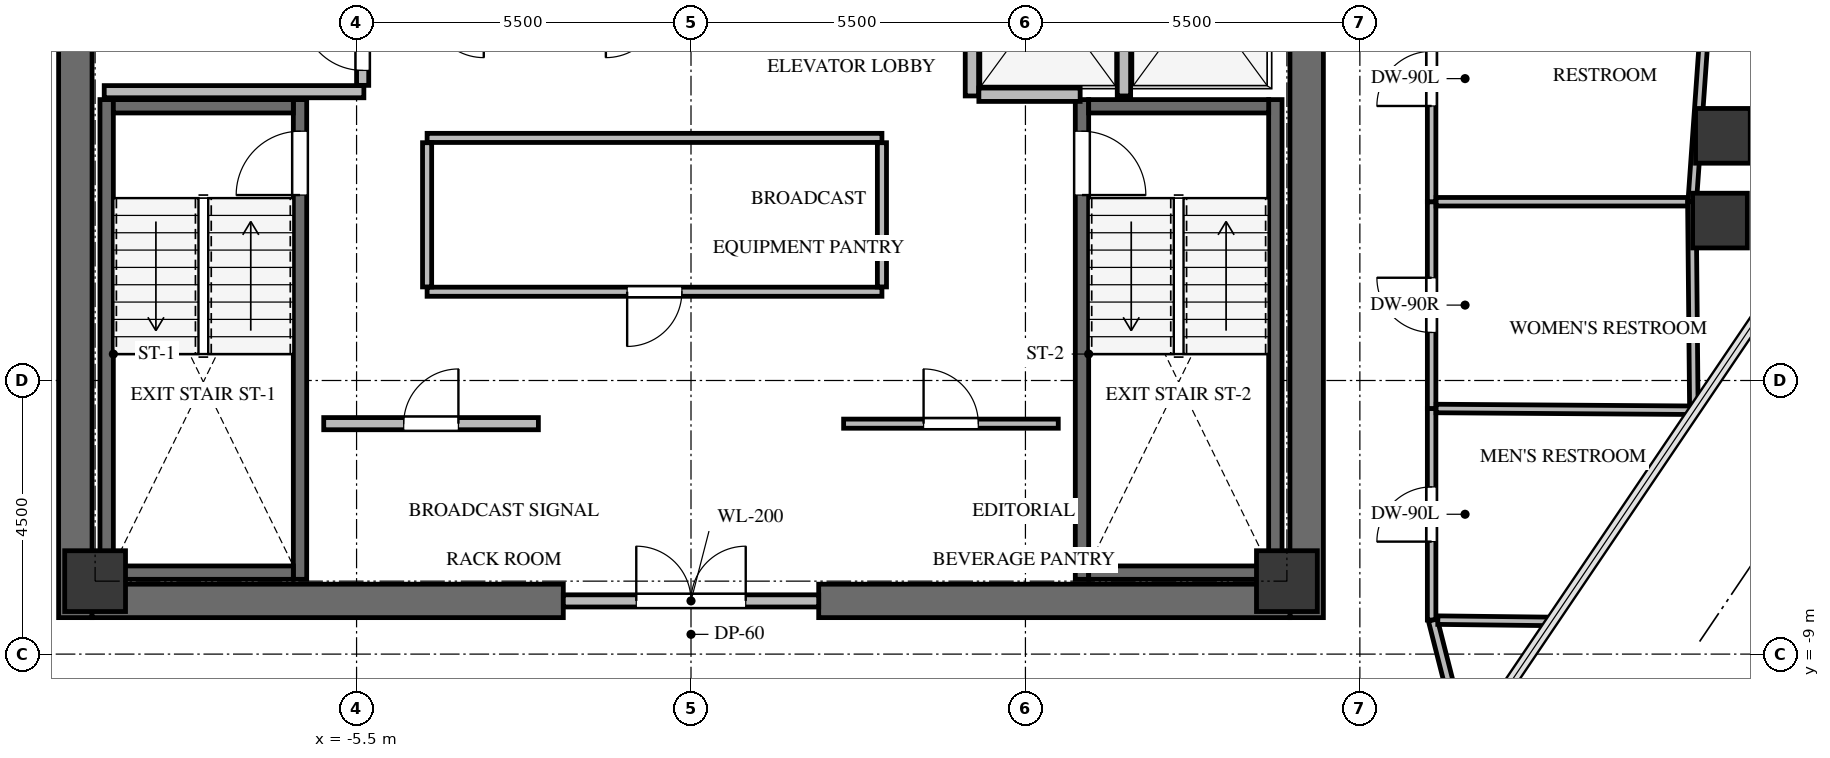
"""IFC4 building model, lengths in metres.
Left out: names, types, materials, properties, quantities, classifications, styles, units other than length and angle.
Written with IfcOpenShell. Run it as: python <this file> out.ifc"""

import sys

from ifc_helpers import new_model, si_unit, direction, frame, frame_2d, origin, origin_2d, place, context, subcontext, project, spatial, rectangle, extrude, source, transform, mapped, element, fill, save


model = new_model("IFC4")
c1 = context("Model", 3, precision=1e-05, world=origin(), true_north=direction((0.0, 1.0)))
c2 = subcontext(c1, "Body", "Model", "MODEL_VIEW")
j1 = project(units=[si_unit("LENGTHUNIT", "METRE"), si_unit("PLANEANGLEUNIT", "RADIAN")], contexts=[c1])
p1 = place(None, origin())
s1 = spatial("IfcSite", under=j1, at=p1, CompositionType="ELEMENT")
p2 = place(p1, origin())
s2 = spatial("IfcBuilding", under=s1, at=p2, CompositionType="ELEMENT")
p3 = place(p2, frame((0.0, 0.0, 241.4)))
s3 = spatial("IfcBuildingStorey", under=s2, at=p3, CompositionType="ELEMENT", Elevation=241.4)
for number, where, z_axis, x_axis in (
    (1, (-10.125, -8.4, 0.0), (0.0, 0.0, 1.0), (0.0, 1.0, 0.0)),
    (2, (10.125, -8.4, 0.0), (0.0, 0.0, 1.0), (0.0, 1.0, 0.0)),
):
    element("IfcWall", number, at=place(p3, frame(where, z_axis=z_axis, x_axis=x_axis)), inside=s3, PredefinedType="SHEAR", context=c2, shape_type="SweptSolid", body=[
        extrude(rectangle(XDim=16.8, YDim=0.55, at=frame_2d((8.4, 0.0))), origin(), (0.0, 0.0, 1.0), 3.3),
    ])
for number, where, z_axis, x_axis in (
    (3, (-9.85, -8.125, 0.0), (0.0, 0.0, 1.0), (1.0, 0.0, 0.0)),
    (4, (2.1, -8.125, 0.0), (0.0, 0.0, 1.0), (1.0, 0.0, 0.0)),
):
    element("IfcWall", number, at=place(p3, frame(where, z_axis=z_axis, x_axis=x_axis)), inside=s3, PredefinedType="SHEAR", context=c2, shape_type="SweptSolid", body=[
        extrude(rectangle(XDim=7.75, YDim=0.55, at=frame_2d((3.875, 0.0))), origin(), (0.0, 0.0, 1.0), 3.3),
    ])
p4 = place(p3, frame((-6.43, -7.77, -0.24), z_axis=(0.0, 0.0, 1.0), x_axis=(0.0, 1.0, 0.0)))
e5 = element("IfcWall", 5, at=p4, inside=s3, PredefinedType="SHEAR", context=c2, shape_type="SweptSolid", body=[
    extrude(rectangle(XDim=7.89, YDim=0.22, at=frame_2d((3.945, 0.0))), origin(), (0.0, 0.0, 1.0), 3.3),
])
p5 = place(p4, frame((6.32, 0.0, 0.0)))
e6 = element("IfcOpeningElement", 6, at=p5, cuts=e5, PredefinedType="OPENING", context=c2, shape_type="SweptSolid", body=[
    extrude(rectangle(XDim=1.05, YDim=2.15, at=frame_2d((0.525, 1.075))), frame((0.0, 0.12, 0.0), z_axis=(0.0, -1.0, 0.0), x_axis=(1.0, 0.0, 0.0)), (0.0, 0.0, 1.0), 0.24),
])
p6 = place(p3, frame((-9.61, 0.12, -0.24), z_axis=(0.0, 0.0, 1.0), x_axis=(0.0, -1.0, 0.0)))
e7 = element("IfcWall", 7, at=p6, inside=s3, PredefinedType="SHEAR", context=c2, shape_type="SweptSolid", body=[
    extrude(rectangle(XDim=7.89, YDim=0.22, at=frame_2d((3.945, 0.0))), origin(), (0.0, 0.0, 1.0), 3.3),
])
for number, where, z_axis, x_axis in (
    (8, (-9.5, -7.66, -0.24), (0.0, 0.0, 1.0), (1.0, 0.0, 0.0)),
    (9, (-6.54, 0.01, -0.24), (0.0, 0.0, 1.0), (-1.0, 0.0, 0.0)),
):
    element("IfcWall", number, at=place(p3, frame(where, z_axis=z_axis, x_axis=x_axis)), inside=s3, PredefinedType="SHEAR", context=c2, shape_type="SweptSolid", body=[
        extrude(rectangle(XDim=2.96, YDim=0.22, at=frame_2d((1.48, 0.0))), origin(), (0.0, 0.0, 1.0), 3.3),
    ])
p7 = place(p3, frame((9.61, -7.77, -0.24), z_axis=(0.0, 0.0, 1.0), x_axis=(0.0, 1.0, 0.0)))
e10 = element("IfcWall", 10, at=p7, inside=s3, PredefinedType="SHEAR", context=c2, shape_type="SweptSolid", body=[
    extrude(rectangle(XDim=7.89, YDim=0.22, at=frame_2d((3.945, 0.0))), origin(), (0.0, 0.0, 1.0), 3.3),
])
p8 = place(p3, frame((6.43, 0.12, -0.24), z_axis=(0.0, 0.0, 1.0), x_axis=(0.0, -1.0, 0.0)))
e11 = element("IfcWall", 11, at=p8, inside=s3, PredefinedType="SHEAR", context=c2, shape_type="SweptSolid", body=[
    extrude(rectangle(XDim=7.89, YDim=0.22, at=frame_2d((3.945, 0.0))), origin(), (0.0, 0.0, 1.0), 3.3),
])
p9 = place(p8, frame((0.52, 0.0, 0.0)))
e12 = element("IfcOpeningElement", 12, at=p9, cuts=e11, PredefinedType="OPENING", context=c2, shape_type="SweptSolid", body=[
    extrude(rectangle(XDim=1.05, YDim=2.15, at=frame_2d((0.525, 1.075))), frame((0.0, 0.12, 0.0), z_axis=(0.0, -1.0, 0.0), x_axis=(1.0, 0.0, 0.0)), (0.0, 0.0, 1.0), 0.24),
])
for number, where, z_axis, x_axis in (
    (13, (6.54, -7.66, -0.24), (0.0, 0.0, 1.0), (1.0, 0.0, 0.0)),
    (14, (9.5, 0.01, -0.24), (0.0, 0.0, 1.0), (-1.0, 0.0, 0.0)),
):
    element("IfcWall", number, at=place(p3, frame(where, z_axis=z_axis, x_axis=x_axis)), inside=s3, PredefinedType="SHEAR", context=c2, shape_type="SweptSolid", body=[
        extrude(rectangle(XDim=2.96, YDim=0.22, at=frame_2d((1.48, 0.0))), origin(), (0.0, 0.0, 1.0), 3.3),
    ])
m1 = source(origin(), c2, "Body", "SweptSolid", [
    extrude(rectangle(XDim=1.0, YDim=1.0, at=origin_2d()), origin(), (0.0, 0.0, 1.0), 3.3),
])
for number, where, z_axis, x_axis in (
    (15, (-9.8, -7.8, -0.24), (0.0, 0.0, 1.0), (1.0, 0.0, 0.0)),
    (16, (9.8, -7.8, -0.24), (0.0, 0.0, 1.0), (1.0, 0.0, 0.0)),
):
    element("IfcColumn", number, at=place(p3, frame(where, z_axis=z_axis, x_axis=x_axis)), inside=s3, PredefinedType="COLUMN", context=c2, shape_type="MappedRepresentation", body=[
        mapped(m1, transform((0.0, 0.0, 0.0), x_axis=(1.0, 0.0, 0.0), y_axis=(0.0, 1.0, 0.0), z_axis=(0.0, 0.0, 1.0), scale=1.0)),
    ])
m2 = source(origin(), c2, "Body", "SweptSolid", [
    extrude(rectangle(XDim=0.9, YDim=0.9, at=origin_2d()), origin(), (0.0, 0.0, 1.0), 3.3),
])
for number, where, z_axis, x_axis in (
    (17, (16.97, -0.476, -0.24), (0.0, 0.0, 1.0), (1.0, 0.0, 0.0)),
    (18, (16.922, -1.87, -0.24), (0.0, 0.0, 1.0), (1.0, 0.0, 0.0)),
):
    element("IfcColumn", number, at=place(p3, frame(where, z_axis=z_axis, x_axis=x_axis)), inside=s3, PredefinedType="COLUMN", context=c2, shape_type="MappedRepresentation", body=[
        mapped(m2, transform((0.0, 0.0, 0.0), x_axis=(1.0, 0.0, 0.0), y_axis=(0.0, 1.0, 0.0), z_axis=(0.0, 0.0, 1.0), scale=1.0)),
    ])
p10 = place(p3, frame((-2.1, -8.125, 0.0), z_axis=(0.0, 0.0, 1.0), x_axis=(1.0, 0.0, 0.0)))
e19 = element("IfcWall", 19, at=p10, inside=s3, PredefinedType="SOLIDWALL", context=c2, shape_type="SweptSolid", body=[
    extrude(rectangle(XDim=4.2, YDim=0.2, at=frame_2d((2.1, 0.0))), origin(), (0.0, 0.0, 1.0), 3.045),
])
p11 = place(p10, frame((1.2, 0.0, 0.0)))
e20 = element("IfcOpeningElement", 20, at=p11, cuts=e19, PredefinedType="OPENING", context=c2, shape_type="SweptSolid", body=[
    extrude(rectangle(XDim=1.8, YDim=2.15, at=frame_2d((0.9, 1.075))), frame((0.0, 0.11, 0.0), z_axis=(0.0, -1.0, 0.0), x_axis=(1.0, 0.0, 0.0)), (0.0, 0.0, 1.0), 0.22),
])
p12 = place(p3, frame((-9.65, 0.25, 0.0), z_axis=(0.0, 0.0, 1.0), x_axis=(1.0, 0.0, 0.0)))
e21 = element("IfcWall", 21, at=p12, inside=s3, PredefinedType="SOLIDWALL", context=c2, shape_type="SweptSolid", body=[
    extrude(rectangle(XDim=4.27, YDim=0.2, at=frame_2d((2.135, 0.0))), origin(), (0.0, 0.0, 1.0), 3.045),
])
p13 = place(p3, frame((-5.4, 0.354, 0.0), z_axis=(0.0, 0.0, 1.0), x_axis=(0.0, 1.0, 0.0)))
e22 = element("IfcWall", 22, at=p13, inside=s3, PredefinedType="SOLIDWALL", context=c2, shape_type="SweptSolid", body=[
    extrude(rectangle(XDim=4.026, YDim=0.2, at=frame_2d((2.013, 0.0))), origin(), (0.0, 0.0, 1.0), 3.045),
])
p14 = place(p13, frame((0.246, 0.0, 0.0)))
e23 = element("IfcOpeningElement", 23, at=p14, cuts=e22, PredefinedType="OPENING", context=c2, shape_type="SweptSolid", body=[
    extrude(rectangle(XDim=1.0, YDim=2.15, at=frame_2d((0.5, 1.075))), frame((0.0, 0.11, 0.0), z_axis=(0.0, -1.0, 0.0), x_axis=(1.0, 0.0, 0.0)), (0.0, 0.0, 1.0), 0.22),
])
for number, where, z_axis, x_axis in (
    (24, (4.62, 0.18, 0.0), (0.0, 0.0, 1.0), (0.0, 1.0, 0.0)),
    (25, (7.12, 0.18, 0.0), (0.0, 0.0, 1.0), (0.0, 1.0, 0.0)),
):
    element("IfcWall", number, at=place(p3, frame(where, z_axis=z_axis, x_axis=x_axis)), inside=s3, PredefinedType="SOLIDWALL", context=c2, shape_type="SweptSolid", body=[
        extrude(rectangle(XDim=3.186, YDim=0.22, at=frame_2d((1.593, 0.0))), origin(), (0.0, 0.0, 1.0), 3.045),
    ])
p15 = place(p3, frame((4.734, 0.2, 0.0), z_axis=(0.0, 0.0, 1.0), x_axis=(1.0, 0.0, 0.0)))
e26 = element("IfcWall", 26, at=p15, inside=s3, PredefinedType="SOLIDWALL", context=c2, shape_type="SweptSolid", body=[
    extrude(rectangle(XDim=1.666, YDim=0.22, at=frame_2d((0.833, 0.0))), origin(), (0.0, 0.0, 1.0), 3.045),
])
p16 = place(p3, frame((-6.04, -5.21, 0.0), z_axis=(0.0, 0.0, 1.0), x_axis=(1.0, 0.0, 0.0)))
e27 = element("IfcWall", 27, at=p16, inside=s3, PredefinedType="SOLIDWALL", context=c2, shape_type="SweptSolid", body=[
    extrude(rectangle(XDim=3.53, YDim=0.2, at=frame_2d((1.765, 0.0))), origin(), (0.0, 0.0, 1.0), 3.045),
])
p17 = place(p16, frame((1.315, 0.0, 0.0)))
e28 = element("IfcOpeningElement", 28, at=p17, cuts=e27, PredefinedType="OPENING", context=c2, shape_type="SweptSolid", body=[
    extrude(rectangle(XDim=0.9, YDim=2.05, at=frame_2d((0.45, 1.025))), frame((0.0, 0.11, 0.0), z_axis=(0.0, -1.0, 0.0), x_axis=(1.0, 0.0, 0.0)), (0.0, 0.0, 1.0), 0.22),
])
p18 = place(p3, frame((2.51, -5.21, 0.0), z_axis=(0.0, 0.0, 1.0), x_axis=(1.0, 0.0, 0.0)))
e29 = element("IfcWall", 29, at=p18, inside=s3, PredefinedType="PARTITIONING", context=c2, shape_type="SweptSolid", body=[
    extrude(rectangle(XDim=3.53, YDim=0.15, at=frame_2d((1.765, 0.0))), origin(), (0.0, 0.0, 1.0), 3.045),
])
p19 = place(p18, frame((1.315, 0.0, 0.0)))
e30 = element("IfcOpeningElement", 30, at=p19, cuts=e29, PredefinedType="OPENING", context=c2, shape_type="SweptSolid", body=[
    extrude(rectangle(XDim=0.9, YDim=2.05, at=frame_2d((0.45, 1.025))), frame((0.0, 0.085, 0.0), z_axis=(0.0, -1.0, 0.0), x_axis=(1.0, 0.0, 0.0)), (0.0, 0.0, 1.0), 0.17),
])
p20 = place(p3, frame((3.14, -3.04, 0.0), z_axis=(0.0, 0.0, 1.0), x_axis=(-1.0, 0.0, 0.0)))
e31 = element("IfcWall", 31, at=p20, inside=s3, PredefinedType="PARTITIONING", context=c2, shape_type="SweptSolid", body=[
    extrude(rectangle(XDim=7.48, YDim=0.15, at=frame_2d((3.74, 0.0))), origin(), (0.0, 0.0, 1.0), 3.045),
])
p21 = place(p20, frame((3.29, 0.0, 0.0)))
e32 = element("IfcOpeningElement", 32, at=p21, cuts=e31, PredefinedType="OPENING", context=c2, shape_type="SweptSolid", body=[
    extrude(rectangle(XDim=0.9, YDim=2.05, at=frame_2d((0.45, 1.025))), frame((0.0, 0.085, 0.0), z_axis=(0.0, -1.0, 0.0), x_axis=(1.0, 0.0, 0.0)), (0.0, 0.0, 1.0), 0.17),
])
p22 = place(p3, frame((-4.34, -0.51, 0.0), z_axis=(0.0, 0.0, 1.0), x_axis=(1.0, 0.0, 0.0)))
e33 = element("IfcWall", 33, at=p22, inside=s3, PredefinedType="PARTITIONING", context=c2, shape_type="SweptSolid", body=[
    extrude(rectangle(XDim=7.48, YDim=0.15, at=frame_2d((3.74, 0.0))), origin(), (0.0, 0.0, 1.0), 3.045),
])
for number, where, z_axis, x_axis in (
    (34, (-4.34, -2.961, 0.0), (0.0, 0.0, 1.0), (0.0, 1.0, 0.0)),
    (35, (3.14, -0.589, 0.0), (0.0, 0.0, 1.0), (0.0, -1.0, 0.0)),
):
    element("IfcWall", number, at=place(p3, frame(where, z_axis=z_axis, x_axis=x_axis)), inside=s3, PredefinedType="PARTITIONING", context=c2, shape_type="SweptSolid", body=[
        extrude(rectangle(XDim=2.372, YDim=0.15, at=frame_2d((1.186, 0.0))), origin(), (0.0, 0.0, 1.0), 3.045),
    ])
p23 = place(p3, frame((12.18, -8.44, 0.0), z_axis=(0.0, 0.0, 1.0), x_axis=(0.0, 1.0, 0.0)))
e36 = element("IfcWall", 36, at=p23, inside=s3, PredefinedType="PARTITIONING", context=c2, shape_type="SweptSolid", body=[
    extrude(rectangle(XDim=3.48, YDim=0.14, at=frame_2d((1.74, 0.0))), origin(), (0.0, 0.0, 1.0), 2.399),
])
p24 = place(p23, frame((1.29, 0.0, 0.0)))
e37 = element("IfcOpeningElement", 37, at=p24, cuts=e36, PredefinedType="OPENING", context=c2, shape_type="SweptSolid", body=[
    extrude(rectangle(XDim=0.9, YDim=2.05, at=frame_2d((0.45, 1.025))), frame((0.0, 0.08, 0.0), z_axis=(0.0, -1.0, 0.0), x_axis=(1.0, 0.0, 0.0)), (0.0, 0.0, 1.0), 0.16),
])
p25 = place(p3, frame((12.18, -4.96, 0.0), z_axis=(0.0, 0.0, 1.0), x_axis=(0.0, 1.0, 0.0)))
e38 = element("IfcWall", 38, at=p25, inside=s3, PredefinedType="PARTITIONING", context=c2, shape_type="SweptSolid", body=[
    extrude(rectangle(XDim=3.4, YDim=0.14, at=frame_2d((1.7, 0.0))), origin(), (0.0, 0.0, 1.0), 3.045),
])
p26 = place(p25, frame((1.25, 0.0, 0.0)))
e39 = element("IfcOpeningElement", 39, at=p26, cuts=e38, PredefinedType="OPENING", context=c2, shape_type="SweptSolid", body=[
    extrude(rectangle(XDim=0.9, YDim=2.05, at=frame_2d((0.45, 1.025))), frame((0.0, 0.08, 0.0), z_axis=(0.0, -1.0, 0.0), x_axis=(1.0, 0.0, 0.0)), (0.0, 0.0, 1.0), 0.16),
])
p27 = place(p3, frame((12.18, -1.56, 0.0), z_axis=(0.0, 0.0, 1.0), x_axis=(0.0, 1.0, 0.0)))
e40 = element("IfcWall", 40, at=p27, inside=s3, PredefinedType="PARTITIONING", context=c2, shape_type="SweptSolid", body=[
    extrude(rectangle(XDim=4.05, YDim=0.14, at=frame_2d((2.025, 0.0))), origin(), (0.0, 0.0, 1.0), 2.302),
])
p28 = place(p27, frame((1.575, 0.0, 0.0)))
e41 = element("IfcOpeningElement", 41, at=p28, cuts=e40, PredefinedType="OPENING", context=c2, shape_type="SweptSolid", body=[
    extrude(rectangle(XDim=0.9, YDim=2.05, at=frame_2d((0.45, 1.025))), frame((0.0, 0.08, 0.0), z_axis=(0.0, -1.0, 0.0), x_axis=(1.0, 0.0, 0.0)), (0.0, 0.0, 1.0), 0.16),
])
p29 = place(p3, frame((12.719, -10.478, 0.0), z_axis=(0.0, 0.0, 1.0), x_axis=(-0.246522636262, 0.969137033556, 0.0)))
e42 = element("IfcWall", 42, at=p29, inside=s3, PredefinedType="PARTITIONING", context=c2, shape_type="SweptSolid", body=[
    extrude(rectangle(XDim=2.103, YDim=0.15, at=frame_2d((1.051, 0.0))), origin(), (0.0, 0.0, 1.0), 2.399),
])
p30 = place(p3, frame((12.254, -4.96, 0.0), z_axis=(0.0, 0.0, 1.0), x_axis=(0.999976630429, -0.006836563198, 0.0)))
e43 = element("IfcWall", 43, at=p30, inside=s3, PredefinedType="PARTITIONING", context=c2, shape_type="SweptSolid", body=[
    extrude(rectangle(XDim=4.25, YDim=0.14, at=frame_2d((2.125, 0.0))), origin(), (0.0, 0.0, 1.0), 2.399),
])
p31 = place(p3, frame((14.156, -8.462, 0.0), z_axis=(0.0, 0.0, 1.0), x_axis=(-0.999935742613, 0.011336253532, 0.0)))
e44 = element("IfcWall", 44, at=p31, inside=s3, PredefinedType="PARTITIONING", context=c2, shape_type="SweptSolid", body=[
    extrude(rectangle(XDim=1.874, YDim=0.14, at=frame_2d((0.937, 0.0))), origin(), (0.0, 0.0, 1.0), 2.399),
])
p32 = place(p3, frame((12.254, -1.56, 0.0), z_axis=(0.0, 0.0, 1.0), x_axis=(1.0, 0.0, 0.0)))
e45 = element("IfcWall", 45, at=p32, inside=s3, PredefinedType="PARTITIONING", context=c2, shape_type="SweptSolid", body=[
    extrude(rectangle(XDim=4.206, YDim=0.14, at=frame_2d((2.103, 0.0))), origin(), (0.0, 0.0, 1.0), 2.302),
])
p33 = place(p3, frame((16.46, -1.56, 0.0), z_axis=(0.0, 0.0, 1.0), x_axis=(0.009604446748, -0.999953876238, 0.0)))
e46 = element("IfcWall", 46, at=p33, inside=s3, PredefinedType="PARTITIONING", context=c2, shape_type="SweptSolid", body=[
    extrude(rectangle(XDim=3.355, YDim=0.14, at=frame_2d((1.678, 0.0))), origin(), (0.0, 0.0, 1.0), 2.302),
])
p34 = place(p3, frame((16.76, 2.593, 0.0), z_axis=(0.0, 0.0, 1.0), x_axis=(-0.07055102187, -0.997508172053, 0.0)))
e47 = element("IfcWall", 47, at=p34, inside=s3, PredefinedType="PARTITIONING", context=c2, shape_type="SweptSolid", body=[
    extrude(rectangle(XDim=4.163, YDim=0.14, at=frame_2d((2.082, 0.0))), origin(), (0.0, 0.0, 1.0), 2.302),
])
m3 = source(origin(), c2, "Body", "SweptSolid", [
    extrude(rectangle(XDim=1.05, YDim=2.15, at=frame_2d((0.525, 1.075))), frame((0.0, 0.025, 0.0), z_axis=(0.0, -1.0, 0.0), x_axis=(1.0, 0.0, 0.0)), (0.0, 0.0, 1.0), 0.05),
])
p35 = place(p5, origin())
e48 = element("IfcDoor", 48, at=p35, inside=s3, OperationType="SINGLE_SWING_LEFT", PredefinedType="DOOR", context=c2, shape_type="MappedRepresentation", body=[
    mapped(m3, transform((0.0, 0.0, 0.0), x_axis=(1.0, 0.0, 0.0), y_axis=(0.0, 1.0, 0.0), z_axis=(0.0, 0.0, 1.0), scale=1.0)),
])
fill(e6, e48)
m4 = source(origin(), c2, "Body", "SweptSolid", [
    extrude(rectangle(XDim=1.05, YDim=2.15, at=frame_2d((0.525, 1.075))), frame((0.0, 0.025, 0.0), z_axis=(0.0, -1.0, 0.0), x_axis=(1.0, 0.0, 0.0)), (0.0, 0.0, 1.0), 0.05),
])
p36 = place(p9, origin())
e49 = element("IfcDoor", 49, at=p36, inside=s3, OperationType="SINGLE_SWING_RIGHT", PredefinedType="DOOR", context=c2, shape_type="MappedRepresentation", body=[
    mapped(m4, transform((0.0, 0.0, 0.0), x_axis=(1.0, 0.0, 0.0), y_axis=(0.0, 1.0, 0.0), z_axis=(0.0, 0.0, 1.0), scale=1.0)),
])
fill(e12, e49)
m5 = source(origin(), c2, "Body", "SweptSolid", [
    extrude(rectangle(XDim=1.8, YDim=2.15, at=frame_2d((0.9, 1.075))), frame((0.0, 0.025, 0.0), z_axis=(0.0, -1.0, 0.0), x_axis=(1.0, 0.0, 0.0)), (0.0, 0.0, 1.0), 0.05),
])
p37 = place(p11, origin())
e50 = element("IfcDoor", 50, at=p37, inside=s3, OperationType="DOUBLE_DOOR_SINGLE_SWING", PredefinedType="DOOR", context=c2, shape_type="MappedRepresentation", body=[
    mapped(m5, transform((0.0, 0.0, 0.0), x_axis=(1.0, 0.0, 0.0), y_axis=(0.0, 1.0, 0.0), z_axis=(0.0, 0.0, 1.0), scale=1.0)),
])
fill(e20, e50)
m6 = source(origin(), c2, "Body", "SweptSolid", [
    extrude(rectangle(XDim=1.0, YDim=2.15, at=frame_2d((0.5, 1.075))), frame((0.0, 0.025, 0.0), z_axis=(0.0, -1.0, 0.0), x_axis=(1.0, 0.0, 0.0)), (0.0, 0.0, 1.0), 0.05),
])
p38 = place(p14, origin())
e51 = element("IfcDoor", 51, at=p38, inside=s3, OperationType="SINGLE_SWING_RIGHT", PredefinedType="DOOR", context=c2, shape_type="MappedRepresentation", body=[
    mapped(m6, transform((0.0, 0.0, 0.0), x_axis=(1.0, 0.0, 0.0), y_axis=(0.0, 1.0, 0.0), z_axis=(0.0, 0.0, 1.0), scale=1.0)),
])
fill(e23, e51)
m7 = source(origin(), c2, "Body", "SweptSolid", [
    extrude(rectangle(XDim=0.9, YDim=2.05, at=frame_2d((0.45, 1.025))), frame((0.0, 0.025, 0.0), z_axis=(0.0, -1.0, 0.0), x_axis=(1.0, 0.0, 0.0)), (0.0, 0.0, 1.0), 0.05),
])
p39 = place(p17, origin())
e52 = element("IfcDoor", 52, at=p39, inside=s3, OperationType="SINGLE_SWING_RIGHT", PredefinedType="DOOR", context=c2, shape_type="MappedRepresentation", body=[
    mapped(m7, transform((0.0, 0.0, 0.0), x_axis=(1.0, 0.0, 0.0), y_axis=(0.0, 1.0, 0.0), z_axis=(0.0, 0.0, 1.0), scale=1.0)),
])
fill(e28, e52)
m8 = source(origin(), c2, "Body", "SweptSolid", [
    extrude(rectangle(XDim=0.9, YDim=2.05, at=frame_2d((0.45, 1.025))), frame((0.0, 0.025, 0.0), z_axis=(0.0, -1.0, 0.0), x_axis=(1.0, 0.0, 0.0)), (0.0, 0.0, 1.0), 0.05),
])
p40 = place(p19, origin())
e53 = element("IfcDoor", 53, at=p40, inside=s3, OperationType="SINGLE_SWING_LEFT", PredefinedType="DOOR", context=c2, shape_type="MappedRepresentation", body=[
    mapped(m8, transform((0.0, 0.0, 0.0), x_axis=(1.0, 0.0, 0.0), y_axis=(0.0, 1.0, 0.0), z_axis=(0.0, 0.0, 1.0), scale=1.0)),
])
fill(e30, e53)
p41 = place(p21, origin())
e54 = element("IfcDoor", 54, at=p41, inside=s3, OperationType="SINGLE_SWING_RIGHT", PredefinedType="DOOR", context=c2, shape_type="MappedRepresentation", body=[
    mapped(m7, transform((0.0, 0.0, 0.0), x_axis=(1.0, 0.0, 0.0), y_axis=(0.0, 1.0, 0.0), z_axis=(0.0, 0.0, 1.0), scale=1.0)),
])
fill(e32, e54)
m9 = source(origin(), c2, "Body", "SweptSolid", [
    extrude(rectangle(XDim=0.9, YDim=2.05, at=frame_2d((0.45, 1.025))), frame((0.0, 0.025, 0.0), z_axis=(0.0, -1.0, 0.0), x_axis=(1.0, 0.0, 0.0)), (0.0, 0.0, 1.0), 0.05),
])
p42 = place(p24, origin())
e55 = element("IfcDoor", 55, at=p42, inside=s3, OperationType="SINGLE_SWING_LEFT", PredefinedType="DOOR", context=c2, shape_type="MappedRepresentation", body=[
    mapped(m9, transform((0.0, 0.0, 0.0), x_axis=(1.0, 0.0, 0.0), y_axis=(0.0, 1.0, 0.0), z_axis=(0.0, 0.0, 1.0), scale=1.0)),
])
fill(e37, e55)
m10 = source(origin(), c2, "Body", "SweptSolid", [
    extrude(rectangle(XDim=0.9, YDim=2.05, at=frame_2d((0.45, 1.025))), frame((0.0, 0.025, 0.0), z_axis=(0.0, -1.0, 0.0), x_axis=(1.0, 0.0, 0.0)), (0.0, 0.0, 1.0), 0.05),
])
p43 = place(p26, origin())
e56 = element("IfcDoor", 56, at=p43, inside=s3, OperationType="SINGLE_SWING_RIGHT", PredefinedType="DOOR", context=c2, shape_type="MappedRepresentation", body=[
    mapped(m10, transform((0.0, 0.0, 0.0), x_axis=(1.0, 0.0, 0.0), y_axis=(0.0, 1.0, 0.0), z_axis=(0.0, 0.0, 1.0), scale=1.0)),
])
fill(e39, e56)
p44 = place(p28, origin())
e57 = element("IfcDoor", 57, at=p44, inside=s3, OperationType="SINGLE_SWING_LEFT", PredefinedType="DOOR", context=c2, shape_type="MappedRepresentation", body=[
    mapped(m9, transform((0.0, 0.0, 0.0), x_axis=(1.0, 0.0, 0.0), y_axis=(0.0, 1.0, 0.0), z_axis=(0.0, 0.0, 1.0), scale=1.0)),
])
fill(e41, e57)
save(model, sys.argv[1])
